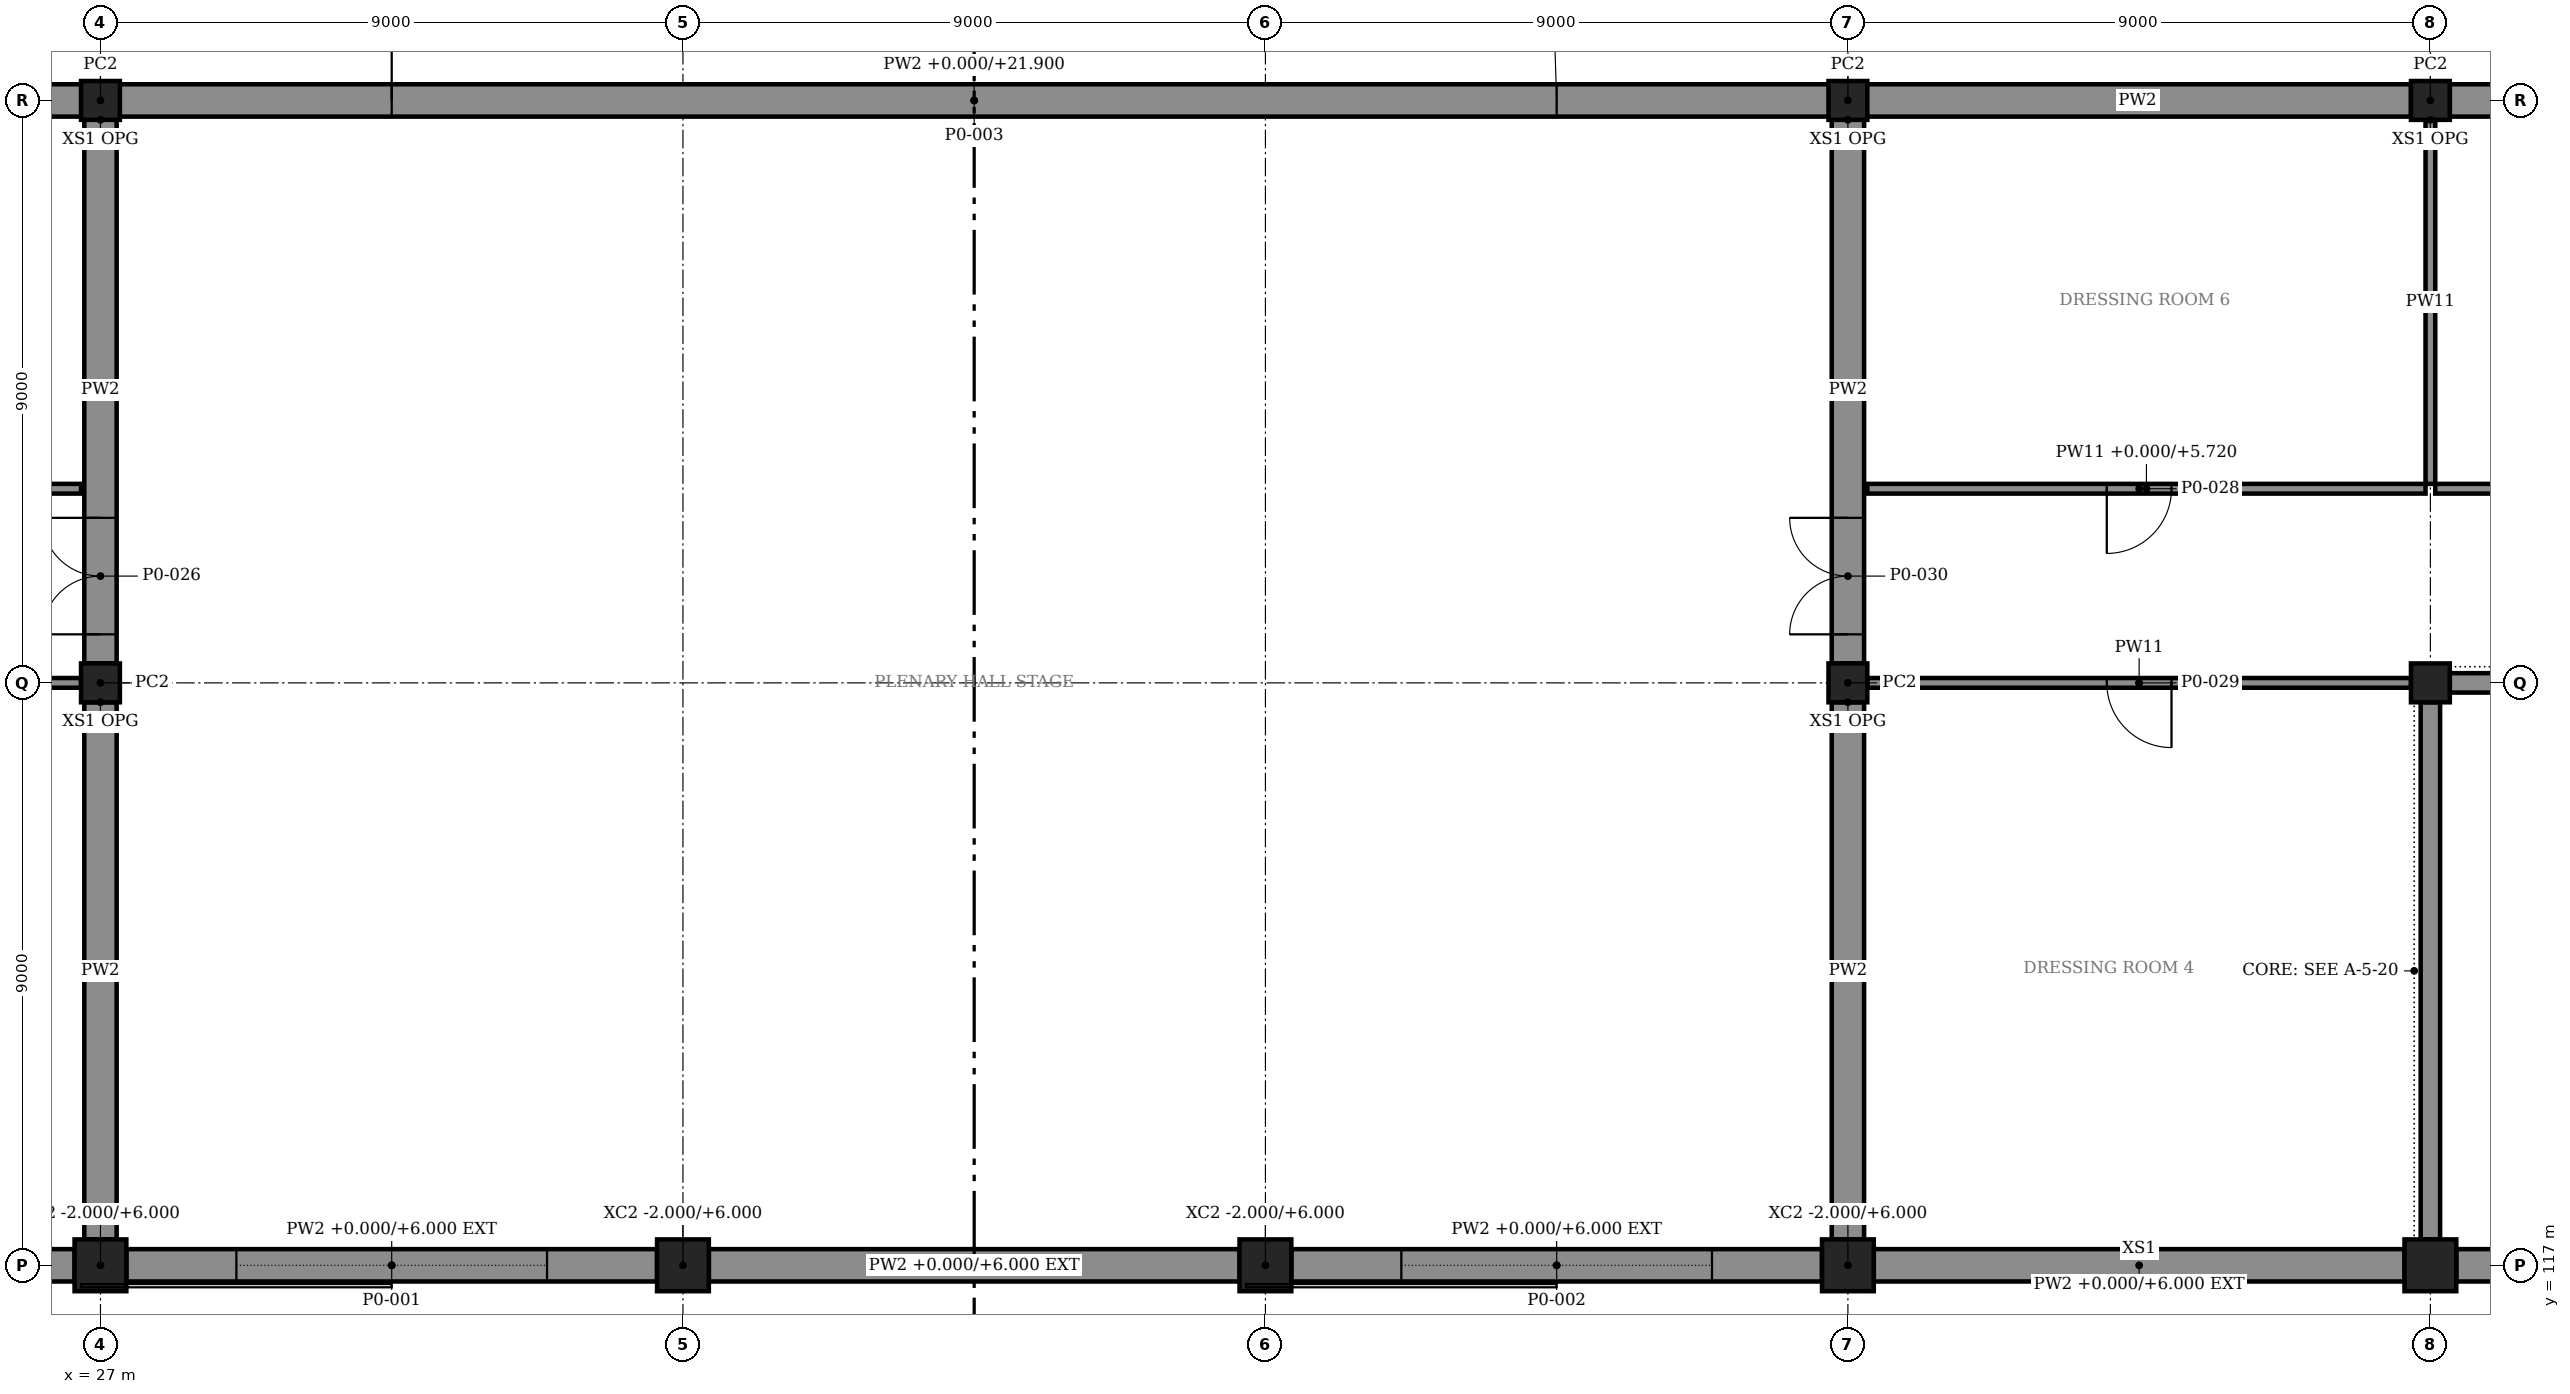
"""IFC4 building model, lengths in metres.
Left out: names, types, materials, properties, quantities, classifications, styles, units other than length and angle.
Written with IfcOpenShell. Run it as: python <this file> out.ifc"""

import sys

from ifc_helpers import new_model, si_unit, direction, frame, frame_2d, origin, origin_2d, place, context, subcontext, project, spatial, polyline, rectangle, outline, extrude, element, fill, save


model = new_model("IFC4")
c1 = context("Model", 3, precision=1e-05, world=origin(), true_north=direction((0.0, 1.0)))
c2 = subcontext(c1, "Body", "Model", "MODEL_VIEW")
j1 = project(units=[si_unit("LENGTHUNIT", "METRE"), si_unit("PLANEANGLEUNIT", "RADIAN")], contexts=[c1])
p1 = place(None, origin())
s1 = spatial("IfcSite", under=j1, at=p1, CompositionType="ELEMENT")
p2 = place(p1, origin())
s2 = spatial("IfcBuilding", under=s1, at=p2, CompositionType="ELEMENT")
p3 = place(p2, origin())
s3 = spatial("IfcBuildingStorey", under=s2, at=p3, CompositionType="ELEMENT", Elevation=0.0)
for number, where, z_axis, x_axis in (
    (1, (27.0, 117.0, -2.0), (0.0, 0.0, 1.0), (1.0, 0.0, 0.0)),
    (2, (36.0, 117.0, -2.0), (0.0, 0.0, 1.0), (1.0, 0.0, 0.0)),
    (3, (45.0, 117.0, -2.0), (0.0, 0.0, 1.0), (1.0, 0.0, 0.0)),
    (4, (54.0, 117.0, -2.0), (0.0, 0.0, 1.0), (1.0, 0.0, 0.0)),
    (5, (63.0, 117.0, -2.0), (0.0, 0.0, 1.0), (1.0, 0.0, 0.0)),
):
    element("IfcColumn", number, at=place(p3, frame(where, z_axis=z_axis, x_axis=x_axis)), inside=s3, PredefinedType="COLUMN", context=c2, shape_type="SweptSolid", body=[
        extrude(rectangle(XDim=0.8, YDim=0.8, at=origin_2d()), origin(), (0.0, 0.0, 1.0), 8.0),
    ])
for number, where, z_axis, x_axis in (
    (6, (27.0, 126.0, -2.0), (0.0, 0.0, 1.0), (1.0, 0.0, 0.0)),
    (7, (54.0, 126.0, -2.0), (0.0, 0.0, 1.0), (1.0, 0.0, 0.0)),
    (8, (63.0, 126.0, -2.0), (0.0, 0.0, 1.0), (1.0, 0.0, 0.0)),
    (9, (27.0, 135.0, -2.0), (0.0, 0.0, 1.0), (1.0, 0.0, 0.0)),
    (10, (54.0, 135.0, -2.0), (0.0, 0.0, 1.0), (1.0, 0.0, 0.0)),
    (11, (63.0, 135.0, -2.0), (0.0, 0.0, 1.0), (1.0, 0.0, 0.0)),
):
    element("IfcColumn", number, at=place(p3, frame(where, z_axis=z_axis, x_axis=x_axis)), inside=s3, PredefinedType="COLUMN", context=c2, shape_type="SweptSolid", body=[
        extrude(rectangle(XDim=0.6, YDim=0.6, at=origin_2d()), origin(), (0.0, 0.0, 1.0), 8.0),
    ])
p4 = place(p3, frame((18.4, 117.0, 0.0), z_axis=(0.0, 0.0, 1.0), x_axis=(1.0, 0.0, 0.0)))
e12 = element("IfcWall", 12, at=p4, inside=s3, PredefinedType="SOLIDWALL", context=c2, shape_type="SweptSolid", body=[
    extrude(rectangle(XDim=8.2, YDim=0.5, at=frame_2d((4.1, 0.0))), origin(), (0.0, 0.0, 1.0), 6.0),
])
p5 = place(p3, frame((27.4, 117.0, 0.0), z_axis=(0.0, 0.0, 1.0), x_axis=(1.0, 0.0, 0.0)))
e13 = element("IfcWall", 13, at=p5, inside=s3, PredefinedType="SOLIDWALL", context=c2, shape_type="SweptSolid", body=[
    extrude(rectangle(XDim=8.2, YDim=0.5, at=frame_2d((4.1, 0.0))), origin(), (0.0, 0.0, 1.0), 6.0),
])
p6 = place(p5, frame((1.7, 0.0, 0.0)))
e14 = element("IfcOpeningElement", 14, at=p6, cuts=e13, PredefinedType="OPENING", context=c2, shape_type="SweptSolid", body=[
    extrude(rectangle(XDim=4.8, YDim=4.5, at=frame_2d((2.4, 2.25))), frame((0.0, 0.26, 0.0), z_axis=(0.0, -1.0, 0.0), x_axis=(1.0, 0.0, 0.0)), (0.0, 0.0, 1.0), 0.52),
])
p7 = place(p3, frame((36.4, 117.0, 0.0), z_axis=(0.0, 0.0, 1.0), x_axis=(1.0, 0.0, 0.0)))
e15 = element("IfcWall", 15, at=p7, inside=s3, PredefinedType="SOLIDWALL", context=c2, shape_type="SweptSolid", body=[
    extrude(rectangle(XDim=8.2, YDim=0.5, at=frame_2d((4.1, 0.0))), origin(), (0.0, 0.0, 1.0), 6.0),
])
p8 = place(p3, frame((45.4, 117.0, 0.0), z_axis=(0.0, 0.0, 1.0), x_axis=(1.0, 0.0, 0.0)))
e16 = element("IfcWall", 16, at=p8, inside=s3, PredefinedType="SOLIDWALL", context=c2, shape_type="SweptSolid", body=[
    extrude(rectangle(XDim=8.2, YDim=0.5, at=frame_2d((4.1, 0.0))), origin(), (0.0, 0.0, 1.0), 6.0),
])
p9 = place(p8, frame((1.7, 0.0, 0.0)))
e17 = element("IfcOpeningElement", 17, at=p9, cuts=e16, PredefinedType="OPENING", context=c2, shape_type="SweptSolid", body=[
    extrude(rectangle(XDim=4.8, YDim=4.5, at=frame_2d((2.4, 2.25))), frame((0.0, 0.26, 0.0), z_axis=(0.0, -1.0, 0.0), x_axis=(1.0, 0.0, 0.0)), (0.0, 0.0, 1.0), 0.52),
])
for number, where, z_axis, x_axis in (
    (18, (54.4, 117.0, 0.0), (0.0, 0.0, 1.0), (1.0, 0.0, 0.0)),
    (19, (63.4, 117.0, 0.0), (0.0, 0.0, 1.0), (1.0, 0.0, 0.0)),
):
    element("IfcWall", number, at=place(p3, frame(where, z_axis=z_axis, x_axis=x_axis)), inside=s3, PredefinedType="SOLIDWALL", context=c2, shape_type="SweptSolid", body=[
        extrude(rectangle(XDim=8.2, YDim=0.5, at=frame_2d((4.1, 0.0))), origin(), (0.0, 0.0, 1.0), 6.0),
    ])
for number, where, z_axis, x_axis in (
    (20, (18.3, 135.0, 0.0), (0.0, 0.0, 1.0), (1.0, 0.0, 0.0)),
    (21, (54.25, 135.0, 0.0), (0.0, 0.0, 1.0), (1.0, 0.0, 0.0)),
):
    element("IfcWall", number, at=place(p3, frame(where, z_axis=z_axis, x_axis=x_axis)), inside=s3, PredefinedType="SOLIDWALL", context=c2, shape_type="SweptSolid", body=[
        extrude(rectangle(XDim=8.45, YDim=0.5, at=frame_2d((4.225, 0.0))), origin(), (0.0, 0.0, 1.0), 4.82),
    ])
p10 = place(p3, frame((63.3, 135.0, 0.0), z_axis=(0.0, 0.0, 1.0), x_axis=(1.0, 0.0, 0.0)))
e22 = element("IfcWall", 22, at=p10, inside=s3, PredefinedType="SOLIDWALL", context=c2, shape_type="SweptSolid", body=[
    extrude(rectangle(XDim=8.3, YDim=0.5, at=frame_2d((4.15, 0.0))), origin(), (0.0, 0.0, 1.0), 4.82),
])
p11 = place(p3, frame((26.75, 135.0, 0.0), z_axis=(0.0, 0.0, 1.0), x_axis=(1.0, 0.0, 0.0)))
e23 = element("IfcWall", 23, at=p11, inside=s3, PredefinedType="SOLIDWALL", context=c2, shape_type="SweptSolid", body=[
    extrude(outline(polyline([(0.0, 0.0), (27.5, 0.0), (27.5, 21.9), (27.25, 22.04), (18.25, 23.183), (9.25, 23.183), (0.25, 22.04), (0.0, 21.9), (0.0, 0.0)])), frame((0.0, 0.25, 0.0), z_axis=(0.0, -1.0, 0.0), x_axis=(1.0, 0.0, 0.0)), (0.0, 0.0, 1.0), 0.5),
])
p12 = place(p11, frame((4.75, 0.0, 0.0)))
e24 = element("IfcOpeningElement", 24, at=p12, cuts=e23, PredefinedType="OPENING", context=c2, shape_type="SweptSolid", body=[
    extrude(rectangle(XDim=18.0, YDim=9.0, at=frame_2d((9.0, 4.5))), frame((0.0, 0.26, 0.0), z_axis=(0.0, -1.0, 0.0), x_axis=(1.0, 0.0, 0.0)), (0.0, 0.0, 1.0), 0.52),
])
p13 = place(p3, frame((27.0, 117.4, 0.0), z_axis=(0.0, 0.0, 1.0), x_axis=(0.0, 1.0, 0.0)))
e25 = element("IfcWall", 25, at=p13, inside=s3, PredefinedType="SOLIDWALL", context=c2, shape_type="SweptSolid", body=[
    extrude(rectangle(XDim=8.3, YDim=0.5, at=frame_2d((4.15, 0.0))), origin(), (0.0, 0.0, 1.0), 4.82),
])
p14 = place(p3, frame((27.0, 126.3, 0.0), z_axis=(0.0, 0.0, 1.0), x_axis=(0.0, 1.0, 0.0)))
e26 = element("IfcWall", 26, at=p14, inside=s3, PredefinedType="SOLIDWALL", context=c2, shape_type="SweptSolid", body=[
    extrude(rectangle(XDim=8.45, YDim=0.5, at=frame_2d((4.225, 0.0))), origin(), (0.0, 0.0, 1.0), 4.82),
])
p15 = place(p14, frame((0.45, 0.0, 0.0)))
e27 = element("IfcOpeningElement", 27, at=p15, cuts=e26, PredefinedType="OPENING", context=c2, shape_type="SweptSolid", body=[
    extrude(rectangle(XDim=1.8, YDim=2.4, at=frame_2d((0.9, 1.2))), frame((0.0, 0.26, 0.0), z_axis=(0.0, -1.0, 0.0), x_axis=(1.0, 0.0, 0.0)), (0.0, 0.0, 1.0), 0.52),
])
p16 = place(p3, frame((54.0, 117.4, 0.0), z_axis=(0.0, 0.0, 1.0), x_axis=(0.0, 1.0, 0.0)))
e28 = element("IfcWall", 28, at=p16, inside=s3, PredefinedType="SOLIDWALL", context=c2, shape_type="SweptSolid", body=[
    extrude(rectangle(XDim=8.3, YDim=0.5, at=frame_2d((4.15, 0.0))), origin(), (0.0, 0.0, 1.0), 4.82),
])
p17 = place(p3, frame((54.0, 126.3, 0.0), z_axis=(0.0, 0.0, 1.0), x_axis=(0.0, 1.0, 0.0)))
e29 = element("IfcWall", 29, at=p17, inside=s3, PredefinedType="SOLIDWALL", context=c2, shape_type="SweptSolid", body=[
    extrude(rectangle(XDim=8.45, YDim=0.5, at=frame_2d((4.225, 0.0))), origin(), (0.0, 0.0, 1.0), 4.82),
])
p18 = place(p17, frame((0.45, 0.0, 0.0)))
e30 = element("IfcOpeningElement", 30, at=p18, cuts=e29, PredefinedType="OPENING", context=c2, shape_type="SweptSolid", body=[
    extrude(rectangle(XDim=1.8, YDim=2.4, at=frame_2d((0.9, 1.2))), frame((0.0, 0.26, 0.0), z_axis=(0.0, -1.0, 0.0), x_axis=(1.0, 0.0, 0.0)), (0.0, 0.0, 1.0), 0.52),
])
p19 = place(p3, frame((63.0, 117.4, 0.0), z_axis=(0.0, 0.0, 1.0), x_axis=(0.0, 1.0, 0.0)))
e31 = element("IfcWall", 31, at=p19, inside=s3, PredefinedType="SOLIDWALL", context=c2, shape_type="SweptSolid", body=[
    extrude(rectangle(XDim=8.3, YDim=0.3, at=frame_2d((4.15, 0.0))), origin(), (0.0, 0.0, 1.0), 4.82),
])
p20 = place(p3, frame((63.3, 126.0, 0.0), z_axis=(0.0, 0.0, 1.0), x_axis=(1.0, 0.0, 0.0)))
e32 = element("IfcWall", 32, at=p20, inside=s3, PredefinedType="SOLIDWALL", context=c2, shape_type="SweptSolid", body=[
    extrude(rectangle(XDim=8.3, YDim=0.3, at=frame_2d((4.15, 0.0))), origin(), (0.0, 0.0, 1.0), 4.82),
])
p21 = place(p20, frame((1.0, 0.0, 0.0)))
e33 = element("IfcOpeningElement", 33, at=p21, cuts=e32, PredefinedType="OPENING", context=c2, shape_type="SweptSolid", body=[
    extrude(rectangle(XDim=1.4, YDim=2.4, at=frame_2d((0.7, 1.2))), frame((0.0, 0.16, 0.0), z_axis=(0.0, -1.0, 0.0), x_axis=(1.0, 0.0, 0.0)), (0.0, 0.0, 1.0), 0.32),
])
p22 = place(p3, frame((18.075, 129.0, 0.0), z_axis=(0.0, 0.0, 1.0), x_axis=(1.0, 0.0, 0.0)))
e34 = element("IfcWall", 34, at=p22, inside=s3, PredefinedType="PARTITIONING", context=c2, shape_type="SweptSolid", body=[
    extrude(rectangle(XDim=8.625, YDim=0.15, at=frame_2d((4.312, 0.0))), origin(), (0.0, 0.0, 1.0), 5.72),
])
p23 = place(p22, frame((3.925, 0.0, 0.0)))
e35 = element("IfcOpeningElement", 35, at=p23, cuts=e34, PredefinedType="OPENING", context=c2, shape_type="SweptSolid", body=[
    extrude(rectangle(XDim=1.0, YDim=2.4, at=frame_2d((0.5, 1.2))), frame((0.0, 0.085, 0.0), z_axis=(0.0, -1.0, 0.0), x_axis=(1.0, 0.0, 0.0)), (0.0, 0.0, 1.0), 0.17),
])
p24 = place(p3, frame((18.3, 126.0, 0.0), z_axis=(0.0, 0.0, 1.0), x_axis=(1.0, 0.0, 0.0)))
e36 = element("IfcWall", 36, at=p24, inside=s3, PredefinedType="PARTITIONING", context=c2, shape_type="SweptSolid", body=[
    extrude(rectangle(XDim=8.4, YDim=0.15, at=frame_2d((4.2, 0.0))), origin(), (0.0, 0.0, 1.0), 4.82),
])
p25 = place(p24, frame((3.7, 0.0, 0.0)))
e37 = element("IfcOpeningElement", 37, at=p25, cuts=e36, PredefinedType="OPENING", context=c2, shape_type="SweptSolid", body=[
    extrude(rectangle(XDim=1.0, YDim=2.4, at=frame_2d((0.5, 1.2))), frame((0.0, 0.085, 0.0), z_axis=(0.0, -1.0, 0.0), x_axis=(1.0, 0.0, 0.0)), (0.0, 0.0, 1.0), 0.17),
])
p26 = place(p3, frame((71.8, 129.0, 0.0), z_axis=(0.0, 0.0, 1.0), x_axis=(-1.0, 0.0, 0.0)))
e38 = element("IfcWall", 38, at=p26, inside=s3, PredefinedType="PARTITIONING", context=c2, shape_type="SweptSolid", body=[
    extrude(rectangle(XDim=8.725, YDim=0.15, at=frame_2d((4.363, 0.0))), origin(), (0.0, 0.0, 1.0), 5.72),
])
p27 = place(p26, frame((3.8, 0.0, 0.0)))
e39 = element("IfcOpeningElement", 39, at=p27, cuts=e38, PredefinedType="OPENING", context=c2, shape_type="SweptSolid", body=[
    extrude(rectangle(XDim=1.0, YDim=2.4, at=frame_2d((0.5, 1.2))), frame((0.0, 0.085, 0.0), z_axis=(0.0, -1.0, 0.0), x_axis=(1.0, 0.0, 0.0)), (0.0, 0.0, 1.0), 0.17),
])
p28 = place(p3, frame((62.925, 129.0, 0.0), z_axis=(0.0, 0.0, 1.0), x_axis=(-1.0, 0.0, 0.0)))
e40 = element("IfcWall", 40, at=p28, inside=s3, PredefinedType="PARTITIONING", context=c2, shape_type="SweptSolid", body=[
    extrude(rectangle(XDim=8.625, YDim=0.15, at=frame_2d((4.312, 0.0))), origin(), (0.0, 0.0, 1.0), 5.72),
])
p29 = place(p28, frame((3.925, 0.0, 0.0)))
e41 = element("IfcOpeningElement", 41, at=p29, cuts=e40, PredefinedType="OPENING", context=c2, shape_type="SweptSolid", body=[
    extrude(rectangle(XDim=1.0, YDim=2.4, at=frame_2d((0.5, 1.2))), frame((0.0, 0.085, 0.0), z_axis=(0.0, -1.0, 0.0), x_axis=(1.0, 0.0, 0.0)), (0.0, 0.0, 1.0), 0.17),
])
p30 = place(p3, frame((63.0, 129.075, 0.0), z_axis=(0.0, 0.0, 1.0), x_axis=(0.0, 1.0, 0.0)))
e42 = element("IfcWall", 42, at=p30, inside=s3, PredefinedType="PARTITIONING", context=c2, shape_type="SweptSolid", body=[
    extrude(rectangle(XDim=5.625, YDim=0.15, at=frame_2d((2.812, 0.0))), origin(), (0.0, 0.0, 1.0), 4.82),
])
p31 = place(p3, frame((62.7, 126.0, 0.0), z_axis=(0.0, 0.0, 1.0), x_axis=(-1.0, 0.0, 0.0)))
e43 = element("IfcWall", 43, at=p31, inside=s3, PredefinedType="PARTITIONING", context=c2, shape_type="SweptSolid", body=[
    extrude(rectangle(XDim=8.4, YDim=0.15, at=frame_2d((4.2, 0.0))), origin(), (0.0, 0.0, 1.0), 4.82),
])
p32 = place(p31, frame((3.7, 0.0, 0.0)))
e44 = element("IfcOpeningElement", 44, at=p32, cuts=e43, PredefinedType="OPENING", context=c2, shape_type="SweptSolid", body=[
    extrude(rectangle(XDim=1.0, YDim=2.4, at=frame_2d((0.5, 1.2))), frame((0.0, 0.085, 0.0), z_axis=(0.0, -1.0, 0.0), x_axis=(1.0, 0.0, 0.0)), (0.0, 0.0, 1.0), 0.17),
])
p33 = place(p6, frame((4.8, 0.0, 0.0), z_axis=(0.0, 0.0, 1.0), x_axis=(-1.0, 0.0, 0.0)))
e45 = element("IfcDoor", 45, at=p33, inside=s3, OperationType="SLIDING_TO_LEFT", PredefinedType="DOOR", context=c2, shape_type="SweptSolid", body=[
    extrude(rectangle(XDim=4.8, YDim=4.5, at=frame_2d((2.4, 2.25))), frame((0.0, 0.025, 0.0), z_axis=(0.0, -1.0, 0.0), x_axis=(1.0, 0.0, 0.0)), (0.0, 0.0, 1.0), 0.05),
])
fill(e14, e45)
p34 = place(p9, frame((4.8, 0.0, 0.0), z_axis=(0.0, 0.0, 1.0), x_axis=(-1.0, 0.0, 0.0)))
e46 = element("IfcDoor", 46, at=p34, inside=s3, OperationType="SLIDING_TO_LEFT", PredefinedType="DOOR", context=c2, shape_type="SweptSolid", body=[
    extrude(rectangle(XDim=4.8, YDim=4.5, at=frame_2d((2.4, 2.25))), frame((0.0, 0.025, 0.0), z_axis=(0.0, -1.0, 0.0), x_axis=(1.0, 0.0, 0.0)), (0.0, 0.0, 1.0), 0.05),
])
fill(e17, e46)
p35 = place(p12, origin())
e47 = element("IfcDoor", 47, at=p35, inside=s3, OperationType="ROLLINGUP", PredefinedType="DOOR", context=c2, shape_type="SweptSolid", body=[
    extrude(rectangle(XDim=18.0, YDim=9.0, at=frame_2d((9.0, 4.5))), frame((0.0, 0.025, 0.0), z_axis=(0.0, -1.0, 0.0), x_axis=(1.0, 0.0, 0.0)), (0.0, 0.0, 1.0), 0.05),
])
fill(e24, e47)
p36 = place(p15, origin())
e48 = element("IfcDoor", 48, at=p36, inside=s3, OperationType="SINGLE_SWING_LEFT", PredefinedType="DOOR", context=c2, shape_type="SweptSolid", body=[
    extrude(rectangle(XDim=1.8, YDim=2.4, at=frame_2d((0.9, 1.2))), frame((0.0, 0.025, 0.0), z_axis=(0.0, -1.0, 0.0), x_axis=(1.0, 0.0, 0.0)), (0.0, 0.0, 1.0), 0.05),
])
fill(e27, e48)
p37 = place(p29, origin())
e49 = element("IfcDoor", 49, at=p37, inside=s3, OperationType="SINGLE_SWING_RIGHT", PredefinedType="DOOR", context=c2, shape_type="SweptSolid", body=[
    extrude(rectangle(XDim=1.0, YDim=2.4, at=frame_2d((0.5, 1.2))), frame((0.0, 0.025, 0.0), z_axis=(0.0, -1.0, 0.0), x_axis=(1.0, 0.0, 0.0)), (0.0, 0.0, 1.0), 0.05),
])
fill(e41, e49)
p38 = place(p32, origin())
e50 = element("IfcDoor", 50, at=p38, inside=s3, OperationType="SINGLE_SWING_LEFT", PredefinedType="DOOR", context=c2, shape_type="SweptSolid", body=[
    extrude(rectangle(XDim=1.0, YDim=2.4, at=frame_2d((0.5, 1.2))), frame((0.0, 0.025, 0.0), z_axis=(0.0, -1.0, 0.0), x_axis=(1.0, 0.0, 0.0)), (0.0, 0.0, 1.0), 0.05),
])
fill(e44, e50)
p39 = place(p18, origin())
e51 = element("IfcDoor", 51, at=p39, inside=s3, OperationType="SINGLE_SWING_LEFT", PredefinedType="DOOR", context=c2, shape_type="SweptSolid", body=[
    extrude(rectangle(XDim=1.8, YDim=2.4, at=frame_2d((0.9, 1.2))), frame((0.0, 0.025, 0.0), z_axis=(0.0, -1.0, 0.0), x_axis=(1.0, 0.0, 0.0)), (0.0, 0.0, 1.0), 0.05),
])
fill(e30, e51)
save(model, sys.argv[1])
